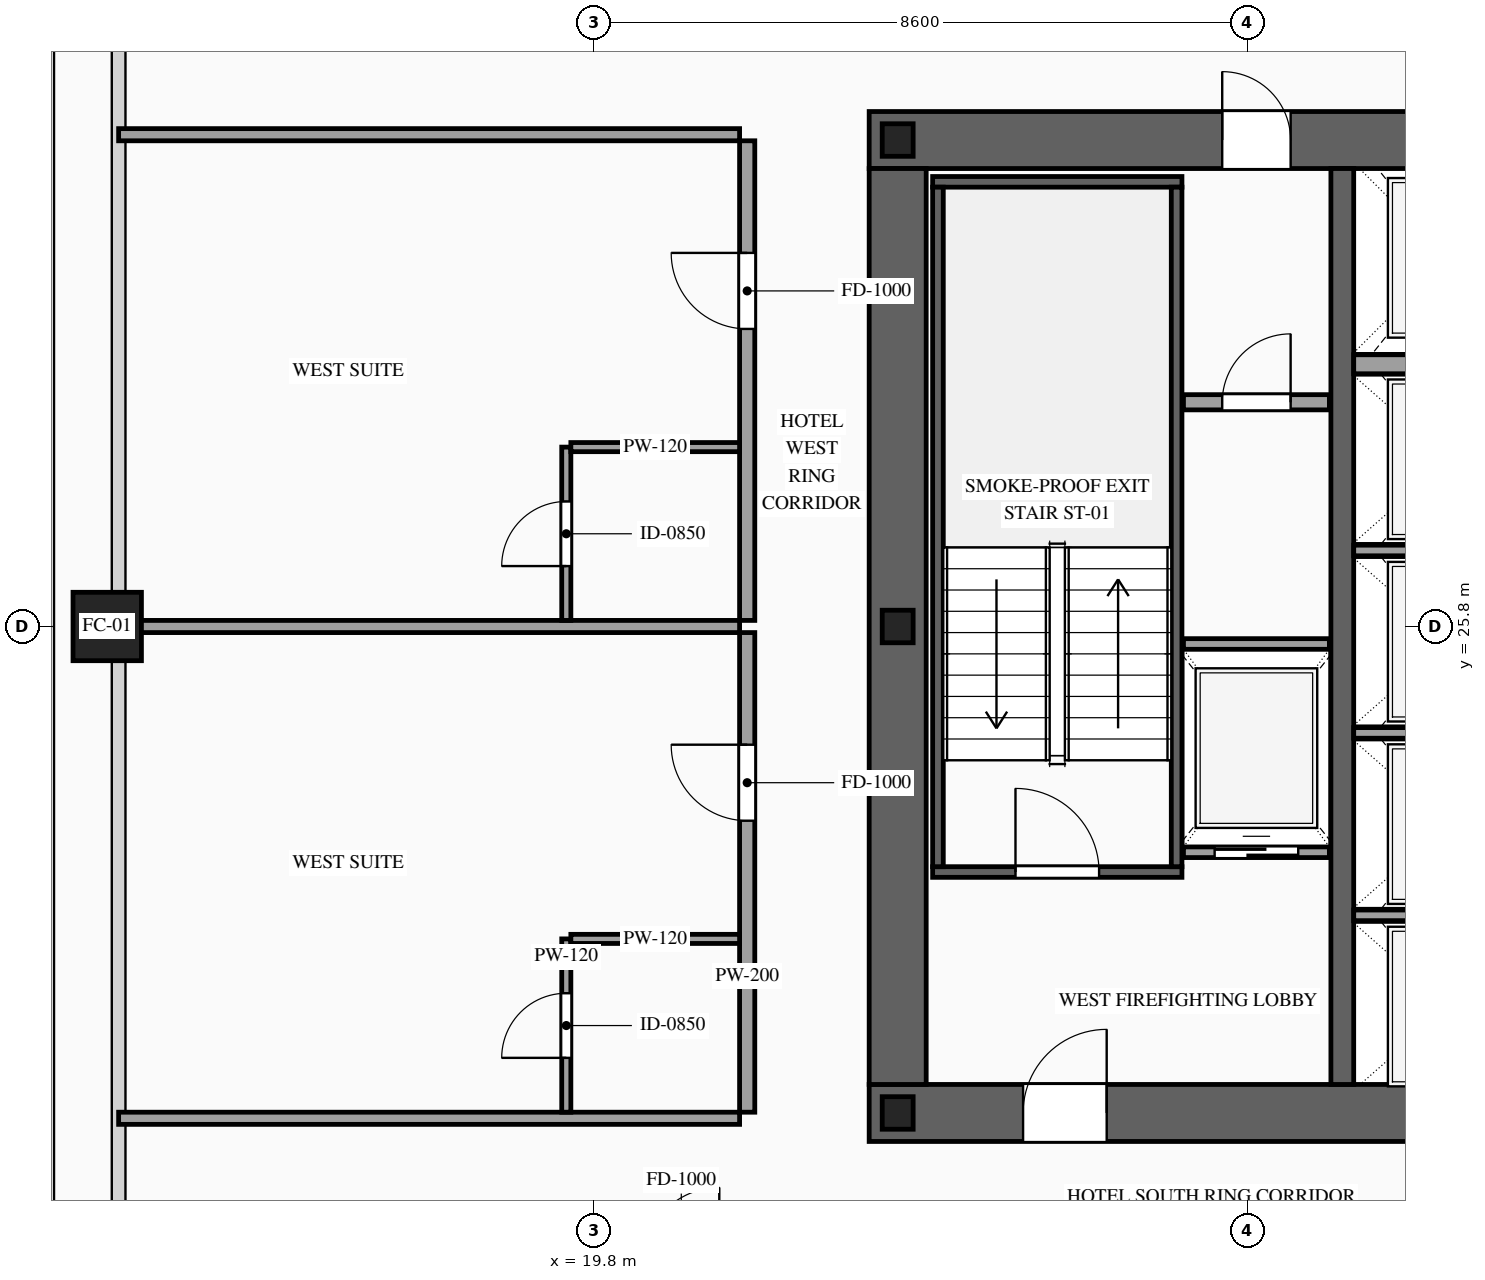
"""IFC4 building model, lengths in metres.
Left out: names, types, materials, properties, quantities, classifications, styles, units other than length and angle.
Written with IfcOpenShell. Run it as: python <this file> out.ifc"""

import sys

from ifc_helpers import new_model, si_unit, direction, frame, frame_2d, origin, origin_2d, place, context, subcontext, project, spatial, rectangle, hollow_rectangle, i_section, extrude, source, transform, mapped, element, fill, save


model = new_model("IFC4")
c1 = context("Model", 3, precision=1e-05, world=origin(), true_north=direction((0.0, 1.0)))
c2 = subcontext(c1, "Body", "Model", "MODEL_VIEW")
j1 = project(units=[si_unit("LENGTHUNIT", "METRE"), si_unit("PLANEANGLEUNIT", "RADIAN")], contexts=[c1])
p1 = place(None, origin())
s1 = spatial("IfcSite", under=j1, at=p1, CompositionType="ELEMENT")
p2 = place(p1, origin())
s2 = spatial("IfcBuilding", under=s1, at=p2, CompositionType="ELEMENT")
p3 = place(p2, frame((0.0, 0.0, 90.2)))
s3 = spatial("IfcBuildingStorey", under=s2, at=p3, CompositionType="ELEMENT", Elevation=90.2)
p4 = place(p3, frame((23.425, 19.4, 0.0), z_axis=(0.0, 0.0, 1.0), x_axis=(1.0, 0.0, 0.0)))
e1 = element("IfcWall", 1, at=p4, inside=s3, PredefinedType="SHEAR", context=c2, shape_type="SweptSolid", body=[
    extrude(rectangle(XDim=27.15, YDim=0.75, at=frame_2d((13.575, 0.0))), origin(), (0.0, 0.0, 1.0), 3.6),
])
p5 = place(p4, frame((2.025, 0.0, 0.0)))
e2 = element("IfcOpeningElement", 2, at=p5, cuts=e1, PredefinedType="OPENING", context=c2, shape_type="SweptSolid", body=[
    extrude(rectangle(XDim=1.1, YDim=2.2, at=frame_2d((0.55, 1.1))), frame((0.0, 0.39, 0.0), z_axis=(0.0, -1.0, 0.0), x_axis=(1.0, 0.0, 0.0)), (0.0, 0.0, 1.0), 0.78),
])
p6 = place(p4, frame((9.925, 0.0, 0.0)))
e3 = element("IfcOpeningElement", 3, at=p6, cuts=e1, PredefinedType="OPENING", context=c2, shape_type="SweptSolid", body=[
    extrude(rectangle(XDim=1.1, YDim=2.2, at=frame_2d((0.55, 1.1))), frame((0.0, 0.39, 0.0), z_axis=(0.0, -1.0, 0.0), x_axis=(1.0, 0.0, 0.0)), (0.0, 0.0, 1.0), 0.78),
])
p7 = place(p4, frame((23.125, 0.0, 0.0)))
e4 = element("IfcOpeningElement", 4, at=p7, cuts=e1, PredefinedType="OPENING", context=c2, shape_type="SweptSolid", body=[
    extrude(rectangle(XDim=1.1, YDim=2.2, at=frame_2d((0.55, 1.1))), frame((0.0, 0.39, 0.0), z_axis=(0.0, -1.0, 0.0), x_axis=(1.0, 0.0, 0.0)), (0.0, 0.0, 1.0), 0.78),
])
p8 = place(p4, frame((19.745, 0.0, 0.0)))
e5 = element("IfcOpeningElement", 5, at=p8, cuts=e1, PredefinedType="OPENING", context=c2, shape_type="SweptSolid", body=[
    extrude(rectangle(XDim=0.9, YDim=2.15, at=frame_2d((0.45, 1.075))), frame((0.0, 0.39, 0.0), z_axis=(0.0, -1.0, 0.0), x_axis=(1.0, 0.0, 0.0)), (0.0, 0.0, 1.0), 0.78),
])
p9 = place(p4, frame((18.305, 0.0, 0.0)))
e6 = element("IfcOpeningElement", 6, at=p9, cuts=e1, PredefinedType="OPENING", context=c2, shape_type="SweptSolid", body=[
    extrude(rectangle(XDim=0.9, YDim=2.15, at=frame_2d((0.45, 1.075))), frame((0.0, 0.39, 0.0), z_axis=(0.0, -1.0, 0.0), x_axis=(1.0, 0.0, 0.0)), (0.0, 0.0, 1.0), 0.78),
])
p10 = place(p3, frame((23.425, 32.2, 0.0), z_axis=(0.0, 0.0, 1.0), x_axis=(1.0, 0.0, 0.0)))
e7 = element("IfcWall", 7, at=p10, inside=s3, PredefinedType="SHEAR", context=c2, shape_type="SweptSolid", body=[
    extrude(rectangle(XDim=27.15, YDim=0.75, at=frame_2d((13.575, 0.0))), origin(), (0.0, 0.0, 1.0), 3.6),
])
p11 = place(p10, frame((4.645, 0.0, 0.0)))
e8 = element("IfcOpeningElement", 8, at=p11, cuts=e7, PredefinedType="OPENING", context=c2, shape_type="SweptSolid", body=[
    extrude(rectangle(XDim=0.9, YDim=2.15, at=frame_2d((0.45, 1.075))), frame((0.0, 0.39, 0.0), z_axis=(0.0, -1.0, 0.0), x_axis=(1.0, 0.0, 0.0)), (0.0, 0.0, 1.0), 0.78),
])
p12 = place(p10, frame((9.925, 0.0, 0.0)))
e9 = element("IfcOpeningElement", 9, at=p12, cuts=e7, PredefinedType="OPENING", context=c2, shape_type="SweptSolid", body=[
    extrude(rectangle(XDim=1.1, YDim=2.2, at=frame_2d((0.55, 1.1))), frame((0.0, 0.39, 0.0), z_axis=(0.0, -1.0, 0.0), x_axis=(1.0, 0.0, 0.0)), (0.0, 0.0, 1.0), 0.78),
])
p13 = place(p10, frame((15.775, 0.0, 0.0)))
e10 = element("IfcOpeningElement", 10, at=p13, cuts=e7, PredefinedType="OPENING", context=c2, shape_type="SweptSolid", body=[
    extrude(rectangle(XDim=1.1, YDim=2.2, at=frame_2d((0.55, 1.1))), frame((0.0, 0.39, 0.0), z_axis=(0.0, -1.0, 0.0), x_axis=(1.0, 0.0, 0.0)), (0.0, 0.0, 1.0), 0.78),
])
p14 = place(p10, frame((18.975, 0.0, 0.0)))
e11 = element("IfcOpeningElement", 11, at=p14, cuts=e7, PredefinedType="OPENING", context=c2, shape_type="SweptSolid", body=[
    extrude(rectangle(XDim=0.9, YDim=2.15, at=frame_2d((0.45, 1.075))), frame((0.0, 0.39, 0.0), z_axis=(0.0, -1.0, 0.0), x_axis=(1.0, 0.0, 0.0)), (0.0, 0.0, 1.0), 0.78),
])
m1 = source(origin(), c2, "Body", "SweptSolid", [
    extrude(rectangle(XDim=12.05, YDim=0.75, at=frame_2d((6.025, 0.0))), origin(), (0.0, 0.0, 1.0), 3.6),
])
p15 = place(p3, frame((23.8, 19.775, 0.0), z_axis=(0.0, 0.0, 1.0), x_axis=(0.0, 1.0, 0.0)))
e12 = element("IfcWall", 12, at=p15, inside=s3, PredefinedType="SHEAR", context=c2, shape_type="MappedRepresentation", body=[
    mapped(m1, transform((0.0, 0.0, 0.0), scale=1.0)),
])
m2 = source(origin(), c2, "Body", "SweptSolid", [
    extrude(rectangle(XDim=12.05, YDim=0.3, at=frame_2d((6.025, 0.0))), origin(), (0.0, 0.0, 1.0), 3.6),
])
p16 = place(p3, frame((29.65, 19.775, 0.0), z_axis=(0.0, 0.0, 1.0), x_axis=(0.0, 1.0, 0.0)))
e13 = element("IfcWall", 13, at=p16, inside=s3, PredefinedType="SOLIDWALL", context=c2, shape_type="MappedRepresentation", body=[
    mapped(m2, transform((0.0, 0.0, 0.0), scale=1.0)),
])
m3 = source(origin(), c2, "Body", "SweptSolid", [
    extrude(i_section(OverallWidth=0.407, OverallDepth=0.428, WebThickness=0.02, FlangeThickness=0.035, at=origin_2d()), origin(), (0.0, 0.0, 1.0), 3.6),
])
for number, where, z_axis, x_axis in (
    (14, (23.8, 19.4, 0.0), (0.0, 0.0, 1.0), (1.0, 0.0, 0.0)),
    (15, (23.8, 25.8, 0.0), (0.0, 0.0, 1.0), (1.0, 0.0, 0.0)),
    (16, (23.8, 32.2, 0.0), (0.0, 0.0, 1.0), (1.0, 0.0, 0.0)),
):
    element("IfcColumn", number, at=place(p3, frame(where, z_axis=z_axis, x_axis=x_axis)), inside=s3, PredefinedType="COLUMN", context=c2, shape_type="MappedRepresentation", body=[
        mapped(m3, transform((0.0, 0.0, 0.0), scale=1.0)),
    ])
m4 = source(origin(), c2, "Body", "SweptSolid", [
    extrude(hollow_rectangle(XDim=0.9, YDim=0.9, WallThickness=0.042, at=origin_2d()), origin(), (0.0, 0.0, 1.0), 3.6),
])
p17 = place(p3, frame((13.4, 25.8, 0.0), z_axis=(0.0, 0.0, 1.0), x_axis=(1.0, 0.0, 0.0)))
e17 = element("IfcColumn", 17, at=p17, inside=s3, PredefinedType="COLUMN", context=c2, shape_type="MappedRepresentation", body=[
    mapped(m4, transform((0.0, 0.0, 0.0), scale=1.0)),
])
p18 = place(p3, frame((27.56, 22.83, 0.0), z_axis=(0.0, 0.0, 1.0), x_axis=(1.0, 0.0, 0.0)))
e18 = element("IfcWall", 18, at=p18, inside=s3, PredefinedType="SOLIDWALL", context=c2, shape_type="SweptSolid", body=[
    extrude(rectangle(XDim=1.92, YDim=0.14, at=frame_2d((0.96, 0.0))), origin(), (0.0, 0.0, 1.0), 3.38),
])
p19 = place(p18, frame((0.41, 0.0, 0.0)))
e19 = element("IfcOpeningElement", 19, at=p19, cuts=e18, PredefinedType="OPENING", context=c2, shape_type="SweptSolid", body=[
    extrude(rectangle(XDim=1.1, YDim=2.2, at=frame_2d((0.55, 1.1))), frame((0.0, 0.085, 0.0), z_axis=(0.0, -1.0, 0.0), x_axis=(1.0, 0.0, 0.0)), (0.0, 0.0, 1.0), 0.17),
])
m5 = source(origin(), c2, "Body", "SweptSolid", [
    extrude(rectangle(XDim=1.92, YDim=0.14, at=frame_2d((0.96, 0.0))), origin(), (0.0, 0.0, 1.0), 3.38),
])
p20 = place(p3, frame((27.56, 25.57, 0.0), z_axis=(0.0, 0.0, 1.0), x_axis=(1.0, 0.0, 0.0)))
e20 = element("IfcWall", 20, at=p20, inside=s3, PredefinedType="SOLIDWALL", context=c2, shape_type="MappedRepresentation", body=[
    mapped(m5, transform((0.0, 0.0, 0.0), scale=1.0)),
])
m6 = source(origin(), c2, "Body", "SweptSolid", [
    extrude(rectangle(XDim=2.5, YDim=0.14, at=frame_2d((1.25, 0.0))), origin(), (0.0, 0.0, 1.0), 3.38),
])
for number, where, z_axis, x_axis in (
    (21, (29.8, 22.0, 0.0), (0.0, 0.0, 1.0), (1.0, 0.0, 0.0)),
    (22, (29.8, 24.4, 0.0), (0.0, 0.0, 1.0), (1.0, 0.0, 0.0)),
    (23, (29.8, 26.8, 0.0), (0.0, 0.0, 1.0), (1.0, 0.0, 0.0)),
):
    element("IfcWall", number, at=place(p3, frame(where, z_axis=z_axis, x_axis=x_axis)), inside=s3, PredefinedType="SOLIDWALL", context=c2, shape_type="MappedRepresentation", body=[
        mapped(m6, transform((0.0, 0.0, 0.0), scale=1.0)),
    ])
m7 = source(origin(), c2, "Body", "SweptSolid", [
    extrude(rectangle(XDim=2.5, YDim=0.25, at=frame_2d((1.25, 0.0))), origin(), (0.0, 0.0, 1.0), 3.38),
])
p21 = place(p3, frame((29.8, 29.25, 0.0), z_axis=(0.0, 0.0, 1.0), x_axis=(1.0, 0.0, 0.0)))
e24 = element("IfcWall", 24, at=p21, inside=s3, PredefinedType="SOLIDWALL", context=c2, shape_type="MappedRepresentation", body=[
    mapped(m7, transform((0.0, 0.0, 0.0), scale=1.0)),
])
p22 = place(p3, frame((24.26, 22.57, 0.0), z_axis=(0.0, 0.0, 1.0), x_axis=(1.0, 0.0, 0.0)))
e25 = element("IfcWall", 25, at=p22, inside=s3, PredefinedType="SOLIDWALL", context=c2, shape_type="SweptSolid", body=[
    extrude(rectangle(XDim=3.28, YDim=0.14, at=frame_2d((1.64, 0.0))), origin(), (0.0, 0.0, 1.0), 3.38),
])
p23 = place(p22, frame((1.09, 0.0, 0.0)))
e26 = element("IfcOpeningElement", 26, at=p23, cuts=e25, PredefinedType="OPENING", context=c2, shape_type="SweptSolid", body=[
    extrude(rectangle(XDim=1.1, YDim=2.2, at=frame_2d((0.55, 1.1))), frame((0.0, 0.085, 0.0), z_axis=(0.0, -1.0, 0.0), x_axis=(1.0, 0.0, 0.0)), (0.0, 0.0, 1.0), 0.17),
])
m8 = source(origin(), c2, "Body", "SweptSolid", [
    extrude(rectangle(XDim=3.28, YDim=0.14, at=frame_2d((1.64, 0.0))), origin(), (0.0, 0.0, 1.0), 3.38),
])
p24 = place(p3, frame((24.26, 31.65, 0.0), z_axis=(0.0, 0.0, 1.0), x_axis=(1.0, 0.0, 0.0)))
e27 = element("IfcWall", 27, at=p24, inside=s3, PredefinedType="SOLIDWALL", context=c2, shape_type="MappedRepresentation", body=[
    mapped(m8, transform((0.0, 0.0, 0.0), scale=1.0)),
])
m9 = source(origin(), c2, "Body", "SweptSolid", [
    extrude(rectangle(XDim=8.94, YDim=0.14, at=frame_2d((4.47, 0.0))), origin(), (0.0, 0.0, 1.0), 3.38),
])
for number, where, z_axis, x_axis in (
    (28, (24.33, 22.64, 0.0), (0.0, 0.0, 1.0), (0.0, 1.0, 0.0)),
    (29, (27.47, 22.64, 0.0), (0.0, 0.0, 1.0), (0.0, 1.0, 0.0)),
):
    element("IfcWall", number, at=place(p3, frame(where, z_axis=z_axis, x_axis=x_axis)), inside=s3, PredefinedType="SOLIDWALL", context=c2, shape_type="MappedRepresentation", body=[
        mapped(m9, transform((0.0, 0.0, 0.0), scale=1.0)),
    ])
p25 = place(p3, frame((27.56, 28.75, 0.0), z_axis=(0.0, 0.0, 1.0), x_axis=(1.0, 0.0, 0.0)))
e30 = element("IfcWall", 30, at=p25, inside=s3, PredefinedType="PARTITIONING", context=c2, shape_type="SweptSolid", body=[
    extrude(rectangle(XDim=1.92, YDim=0.2, at=frame_2d((0.96, 0.0))), origin(), (0.0, 0.0, 1.0), 3.38),
])
p26 = place(p25, frame((0.51, 0.0, 0.0)))
e31 = element("IfcOpeningElement", 31, at=p26, cuts=e30, PredefinedType="OPENING", context=c2, shape_type="SweptSolid", body=[
    extrude(rectangle(XDim=0.9, YDim=2.15, at=frame_2d((0.45, 1.075))), frame((0.0, 0.115, 0.0), z_axis=(0.0, -1.0, 0.0), x_axis=(1.0, 0.0, 0.0)), (0.0, 0.0, 1.0), 0.23),
])
p27 = place(p3, frame((21.82, 19.41, 0.0), z_axis=(0.0, 0.0, 1.0), x_axis=(0.0, 1.0, 0.0)))
e32 = element("IfcWall", 32, at=p27, inside=s3, PredefinedType="PARTITIONING", context=c2, shape_type="SweptSolid", body=[
    extrude(rectangle(XDim=6.31, YDim=0.2, at=frame_2d((3.155, 0.0))), origin(), (0.0, 0.0, 1.0), 3.38),
])
p28 = place(p27, frame((3.835, 0.0, 0.0)))
e33 = element("IfcOpeningElement", 33, at=p28, cuts=e32, PredefinedType="OPENING", context=c2, shape_type="SweptSolid", body=[
    extrude(rectangle(XDim=1.0, YDim=2.2, at=frame_2d((0.5, 1.1))), frame((0.0, 0.115, 0.0), z_axis=(0.0, -1.0, 0.0), x_axis=(1.0, 0.0, 0.0)), (0.0, 0.0, 1.0), 0.23),
])
m10 = source(origin(), c2, "Body", "SweptSolid", [
    extrude(rectangle(XDim=8.17, YDim=0.16, at=frame_2d((4.085, 0.0))), origin(), (0.0, 0.0, 1.0), 2.675),
])
p29 = place(p3, frame((13.55, 25.8, 0.0), z_axis=(0.0, 0.0, 1.0), x_axis=(1.0, 0.0, 0.0)))
e34 = element("IfcWall", 34, at=p29, inside=s3, PredefinedType="PARTITIONING", context=c2, shape_type="MappedRepresentation", body=[
    mapped(m10, transform((0.0, 0.0, 0.0), scale=1.0)),
])
m11 = source(origin(), c2, "Body", "SweptSolid", [
    extrude(rectangle(XDim=8.17, YDim=0.16, at=frame_2d((4.085, 0.0))), origin(), (0.0, 0.0, 1.0), 2.875),
])
p30 = place(p3, frame((13.55, 19.33, 0.0), z_axis=(0.0, 0.0, 1.0), x_axis=(1.0, 0.0, 0.0)))
e35 = element("IfcWall", 35, at=p30, inside=s3, PredefinedType="PARTITIONING", context=c2, shape_type="MappedRepresentation", body=[
    mapped(m11, transform((0.0, 0.0, 0.0), scale=1.0)),
])
p31 = place(p3, frame((19.44, 19.41, 0.0), z_axis=(0.0, 0.0, 1.0), x_axis=(0.0, 1.0, 0.0)))
e36 = element("IfcWall", 36, at=p31, inside=s3, PredefinedType="PARTITIONING", context=c2, shape_type="SweptSolid", body=[
    extrude(rectangle(XDim=2.28, YDim=0.12, at=frame_2d((1.14, 0.0))), origin(), (0.0, 0.0, 1.0), 3.38),
])
p32 = place(p31, frame((0.715, 0.0, 0.0)))
e37 = element("IfcOpeningElement", 37, at=p32, cuts=e36, PredefinedType="OPENING", context=c2, shape_type="SweptSolid", body=[
    extrude(rectangle(XDim=0.85, YDim=2.1, at=frame_2d((0.425, 1.05))), frame((0.0, 0.075, 0.0), z_axis=(0.0, -1.0, 0.0), x_axis=(1.0, 0.0, 0.0)), (0.0, 0.0, 1.0), 0.15),
])
m12 = source(origin(), c2, "Body", "SweptSolid", [
    extrude(rectangle(XDim=2.22, YDim=0.12, at=frame_2d((1.11, 0.0))), origin(), (0.0, 0.0, 1.0), 3.38),
])
p33 = place(p3, frame((19.5, 21.69, 0.0), z_axis=(0.0, 0.0, 1.0), x_axis=(1.0, 0.0, 0.0)))
e38 = element("IfcWall", 38, at=p33, inside=s3, PredefinedType="PARTITIONING", context=c2, shape_type="MappedRepresentation", body=[
    mapped(m12, transform((0.0, 0.0, 0.0), scale=1.0)),
])
p34 = place(p3, frame((21.82, 25.88, 0.0), z_axis=(0.0, 0.0, 1.0), x_axis=(0.0, 1.0, 0.0)))
e39 = element("IfcWall", 39, at=p34, inside=s3, PredefinedType="PARTITIONING", context=c2, shape_type="SweptSolid", body=[
    extrude(rectangle(XDim=6.31, YDim=0.2, at=frame_2d((3.155, 0.0))), origin(), (0.0, 0.0, 1.0), 3.38),
])
p35 = place(p34, frame((3.835, 0.0, 0.0)))
e40 = element("IfcOpeningElement", 40, at=p35, cuts=e39, PredefinedType="OPENING", context=c2, shape_type="SweptSolid", body=[
    extrude(rectangle(XDim=1.0, YDim=2.2, at=frame_2d((0.5, 1.1))), frame((0.0, 0.115, 0.0), z_axis=(0.0, -1.0, 0.0), x_axis=(1.0, 0.0, 0.0)), (0.0, 0.0, 1.0), 0.23),
])
p36 = place(p3, frame((13.55, 32.27, 0.0), z_axis=(0.0, 0.0, 1.0), x_axis=(1.0, 0.0, 0.0)))
e41 = element("IfcWall", 41, at=p36, inside=s3, PredefinedType="PARTITIONING", context=c2, shape_type="MappedRepresentation", body=[
    mapped(m11, transform((0.0, 0.0, 0.0), scale=1.0)),
])
p37 = place(p3, frame((19.44, 25.88, 0.0), z_axis=(0.0, 0.0, 1.0), x_axis=(0.0, 1.0, 0.0)))
e42 = element("IfcWall", 42, at=p37, inside=s3, PredefinedType="PARTITIONING", context=c2, shape_type="SweptSolid", body=[
    extrude(rectangle(XDim=2.28, YDim=0.12, at=frame_2d((1.14, 0.0))), origin(), (0.0, 0.0, 1.0), 3.38),
])
p38 = place(p37, frame((0.715, 0.0, 0.0)))
e43 = element("IfcOpeningElement", 43, at=p38, cuts=e42, PredefinedType="OPENING", context=c2, shape_type="SweptSolid", body=[
    extrude(rectangle(XDim=0.85, YDim=2.1, at=frame_2d((0.425, 1.05))), frame((0.0, 0.075, 0.0), z_axis=(0.0, -1.0, 0.0), x_axis=(1.0, 0.0, 0.0)), (0.0, 0.0, 1.0), 0.15),
])
p39 = place(p3, frame((19.5, 28.16, 0.0), z_axis=(0.0, 0.0, 1.0), x_axis=(1.0, 0.0, 0.0)))
e44 = element("IfcWall", 44, at=p39, inside=s3, PredefinedType="PARTITIONING", context=c2, shape_type="MappedRepresentation", body=[
    mapped(m12, transform((0.0, 0.0, 0.0), scale=1.0)),
])
m13 = source(origin(), c2, "Body", "SweptSolid", [
    extrude(rectangle(XDim=1.1, YDim=2.2, at=frame_2d((0.55, 1.1))), frame((0.0, 0.025, 0.0), z_axis=(0.0, -1.0, 0.0), x_axis=(1.0, 0.0, 0.0)), (0.0, 0.0, 1.0), 0.05),
])
p40 = place(p19, origin())
e45 = element("IfcDoor", 45, at=p40, inside=s3, OperationType="SLIDING_TO_LEFT", PredefinedType="DOOR", context=c2, shape_type="MappedRepresentation", body=[
    mapped(m13, transform((0.0, 0.0, 0.0), scale=1.0)),
])
fill(e19, e45)
m14 = source(origin(), c2, "Body", "SweptSolid", [
    extrude(rectangle(XDim=1.1, YDim=2.2, at=frame_2d((0.55, 1.1))), frame((0.0, 0.025, 0.0), z_axis=(0.0, -1.0, 0.0), x_axis=(1.0, 0.0, 0.0)), (0.0, 0.0, 1.0), 0.05),
])
p41 = place(p23, origin())
e46 = element("IfcDoor", 46, at=p41, inside=s3, OperationType="SINGLE_SWING_LEFT", PredefinedType="DOOR", context=c2, shape_type="MappedRepresentation", body=[
    mapped(m14, transform((0.0, 0.0, 0.0), scale=1.0)),
])
fill(e26, e46)
p42 = place(p5, origin())
e47 = element("IfcDoor", 47, at=p42, inside=s3, OperationType="SINGLE_SWING_RIGHT", PredefinedType="DOOR", context=c2, shape_type="MappedRepresentation", body=[
    mapped(m14, transform((0.0, 0.0, 0.0), scale=1.0)),
])
fill(e2, e47)
m15 = source(origin(), c2, "Body", "SweptSolid", [
    extrude(rectangle(XDim=0.9, YDim=2.15, at=frame_2d((0.45, 1.075))), frame((0.0, 0.025, 0.0), z_axis=(0.0, -1.0, 0.0), x_axis=(1.0, 0.0, 0.0)), (0.0, 0.0, 1.0), 0.05),
])
p43 = place(p11, origin())
e48 = element("IfcDoor", 48, at=p43, inside=s3, OperationType="SINGLE_SWING_LEFT", PredefinedType="DOOR", context=c2, shape_type="MappedRepresentation", body=[
    mapped(m15, transform((0.0, 0.0, 0.0), scale=1.0)),
])
fill(e8, e48)
p44 = place(p26, origin())
e49 = element("IfcDoor", 49, at=p44, inside=s3, OperationType="SINGLE_SWING_RIGHT", PredefinedType="DOOR", context=c2, shape_type="MappedRepresentation", body=[
    mapped(m15, transform((0.0, 0.0, 0.0), scale=1.0)),
])
fill(e31, e49)
m16 = source(origin(), c2, "Body", "SweptSolid", [
    extrude(rectangle(XDim=1.0, YDim=2.2, at=frame_2d((0.5, 1.1))), frame((0.0, 0.025, 0.0), z_axis=(0.0, -1.0, 0.0), x_axis=(1.0, 0.0, 0.0)), (0.0, 0.0, 1.0), 0.05),
])
p45 = place(p28, origin())
e50 = element("IfcDoor", 50, at=p45, inside=s3, OperationType="SINGLE_SWING_RIGHT", PredefinedType="DOOR", context=c2, shape_type="MappedRepresentation", body=[
    mapped(m16, transform((0.0, 0.0, 0.0), scale=1.0)),
])
fill(e33, e50)
m17 = source(origin(), c2, "Body", "SweptSolid", [
    extrude(rectangle(XDim=0.85, YDim=2.1, at=frame_2d((0.425, 1.05))), frame((0.0, 0.025, 0.0), z_axis=(0.0, -1.0, 0.0), x_axis=(1.0, 0.0, 0.0)), (0.0, 0.0, 1.0), 0.05),
])
p46 = place(p32, origin())
e51 = element("IfcDoor", 51, at=p46, inside=s3, OperationType="SINGLE_SWING_LEFT", PredefinedType="DOOR", context=c2, shape_type="MappedRepresentation", body=[
    mapped(m17, transform((0.0, 0.0, 0.0), scale=1.0)),
])
fill(e37, e51)
p47 = place(p35, origin())
e52 = element("IfcDoor", 52, at=p47, inside=s3, OperationType="SINGLE_SWING_RIGHT", PredefinedType="DOOR", context=c2, shape_type="MappedRepresentation", body=[
    mapped(m16, transform((0.0, 0.0, 0.0), scale=1.0)),
])
fill(e40, e52)
p48 = place(p38, origin())
e53 = element("IfcDoor", 53, at=p48, inside=s3, OperationType="SINGLE_SWING_LEFT", PredefinedType="DOOR", context=c2, shape_type="MappedRepresentation", body=[
    mapped(m17, transform((0.0, 0.0, 0.0), scale=1.0)),
])
fill(e43, e53)
save(model, sys.argv[1])
